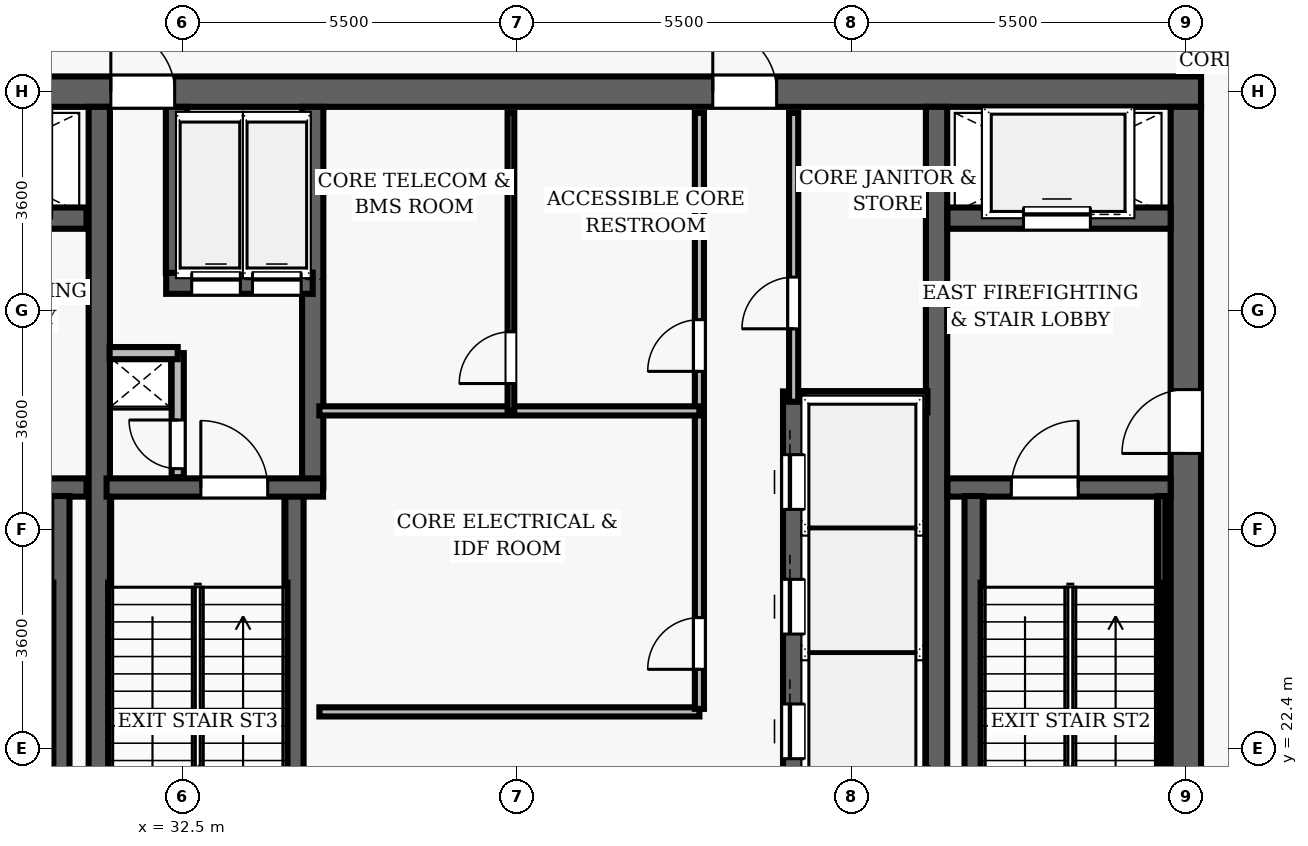
"""IFC4 building model, lengths in metres.
Left out: names, types, materials, properties, quantities, classifications, styles, units other than length and angle.
Written with IfcOpenShell. Run it as: python <this file> out.ifc"""

import sys

from ifc_helpers import new_model, si_unit, direction, frame, frame_2d, origin, place, context, subcontext, project, spatial, rectangle, extrude, element, fill, save


model = new_model("IFC4")
c1 = context("Model", 3, precision=1e-05, world=origin(), true_north=direction((0.0, 1.0)))
c2 = subcontext(c1, "Body", "Model", "MODEL_VIEW")
j1 = project(units=[si_unit("LENGTHUNIT", "METRE"), si_unit("PLANEANGLEUNIT", "RADIAN")], contexts=[c1])
p1 = place(None, origin())
s1 = spatial("IfcSite", under=j1, at=p1, CompositionType="ELEMENT")
p2 = place(p1, origin())
s2 = spatial("IfcBuilding", under=s1, at=p2, CompositionType="ELEMENT")
p3 = place(p2, frame((0.0, 0.0, 236.65)))
s3 = spatial("IfcBuildingStorey", under=s2, at=p3, CompositionType="ELEMENT", Elevation=236.65)
p4 = place(p3, frame((26.75, 33.2, 0.0), z_axis=(0.0, 0.0, 1.0), x_axis=(1.0, 0.0, 0.0)))
e1 = element("IfcWall", 1, at=p4, inside=s3, PredefinedType="SHEAR", context=c2, shape_type="SweptSolid", body=[
    extrude(rectangle(XDim=22.5, YDim=0.5, at=frame_2d((11.25, 0.0))), origin(), (0.0, 0.0, 1.0), 5.4),
])
p5 = place(p4, frame((4.57, 0.0, 0.0)))
e2 = element("IfcOpeningElement", 2, at=p5, cuts=e1, PredefinedType="OPENING", context=c2, shape_type="SweptSolid", body=[
    extrude(rectangle(XDim=1.05, YDim=2.15, at=frame_2d((0.525, 1.075))), frame((0.0, 0.26, 0.0), z_axis=(0.0, -1.0, 0.0), x_axis=(1.0, 0.0, 0.0)), (0.0, 0.0, 1.0), 0.52),
])
p6 = place(p4, frame((14.47, 0.0, 0.0)))
e3 = element("IfcOpeningElement", 3, at=p6, cuts=e1, PredefinedType="OPENING", context=c2, shape_type="SweptSolid", body=[
    extrude(rectangle(XDim=1.05, YDim=2.15, at=frame_2d((0.525, 1.075))), frame((0.0, 0.26, 0.0), z_axis=(0.0, -1.0, 0.0), x_axis=(1.0, 0.0, 0.0)), (0.0, 0.0, 1.0), 0.52),
])
p7 = place(p3, frame((49.0, 19.05, 0.0), z_axis=(0.0, 0.0, 1.0), x_axis=(0.0, 1.0, 0.0)))
e4 = element("IfcWall", 4, at=p7, inside=s3, PredefinedType="SHEAR", context=c2, shape_type="SweptSolid", body=[
    extrude(rectangle(XDim=13.9, YDim=0.5, at=frame_2d((6.95, 0.0))), origin(), (0.0, 0.0, 1.0), 5.4),
])
p8 = place(p7, frame((8.2, 0.0, 0.0)))
e5 = element("IfcOpeningElement", 5, at=p8, cuts=e4, PredefinedType="OPENING", context=c2, shape_type="SweptSolid", body=[
    extrude(rectangle(XDim=1.05, YDim=2.15, at=frame_2d((0.525, 1.075))), frame((0.0, 0.26, 0.0), z_axis=(0.0, -1.0, 0.0), x_axis=(1.0, 0.0, 0.0)), (0.0, 0.0, 1.0), 0.52),
])
for number, where, z_axis, x_axis in (
    (6, (31.13, 19.05, 0.0), (0.0, 0.0, 1.0), (0.0, 1.0, 0.0)),
    (7, (44.9, 19.05, 0.0), (0.0, 0.0, 1.0), (0.0, 1.0, 0.0)),
):
    element("IfcWall", number, at=place(p3, frame(where, z_axis=z_axis, x_axis=x_axis)), inside=s3, PredefinedType="SHEAR", context=c2, shape_type="SweptSolid", body=[
        extrude(rectangle(XDim=13.9, YDim=0.35, at=frame_2d((6.95, 0.0))), origin(), (0.0, 0.0, 1.0), 5.4),
    ])
p9 = place(p3, frame((27.25, 26.69, 0.0), z_axis=(0.0, 0.0, 1.0), x_axis=(1.0, 0.0, 0.0)))
e8 = element("IfcWall", 8, at=p9, inside=s3, PredefinedType="SHEAR", context=c2, shape_type="SweptSolid", body=[
    extrude(rectangle(XDim=3.67, YDim=0.3, at=frame_2d((1.835, 0.0))), origin(), (0.0, 0.0, 1.0), 5.4),
])
p10 = place(p9, frame((1.05, 0.0, 0.0)))
e9 = element("IfcOpeningElement", 9, at=p10, cuts=e8, PredefinedType="OPENING", context=c2, shape_type="SweptSolid", body=[
    extrude(rectangle(XDim=1.1, YDim=2.15, at=frame_2d((0.55, 1.075))), frame((0.0, 0.16, 0.0), z_axis=(0.0, -1.0, 0.0), x_axis=(1.0, 0.0, 0.0)), (0.0, 0.0, 1.0), 0.32),
])
p11 = place(p3, frame((30.49, 19.05, 0.0), z_axis=(0.0, 0.0, 1.0), x_axis=(0.0, 1.0, 0.0)))
e10 = element("IfcWall", 10, at=p11, inside=s3, PredefinedType="SHEAR", context=c2, shape_type="SweptSolid", body=[
    extrude(rectangle(XDim=7.5, YDim=0.3, at=frame_2d((3.75, 0.0))), origin(), (0.0, 0.0, 1.0), 5.4),
])
p12 = place(p3, frame((27.25, 31.12, 0.0), z_axis=(0.0, 0.0, 1.0), x_axis=(1.0, 0.0, 0.0)))
e11 = element("IfcWall", 11, at=p12, inside=s3, PredefinedType="SHEAR", context=c2, shape_type="SweptSolid", body=[
    extrude(rectangle(XDim=3.67, YDim=0.35, at=frame_2d((1.835, 0.0))), origin(), (0.0, 0.0, 1.0), 4.04),
])
p13 = place(p12, frame((1.25, 0.0, 0.0)))
e12 = element("IfcOpeningElement", 12, at=p13, cuts=e11, PredefinedType="OPENING", context=c2, shape_type="SweptSolid", body=[
    extrude(rectangle(XDim=1.1, YDim=2.15, at=frame_2d((0.55, 1.075))), frame((0.0, 0.185, 0.0), z_axis=(0.0, -1.0, 0.0), x_axis=(1.0, 0.0, 0.0)), (0.0, 0.0, 1.0), 0.37),
])
p14 = place(p3, frame((45.08, 26.69, 0.0), z_axis=(0.0, 0.0, 1.0), x_axis=(1.0, 0.0, 0.0)))
e13 = element("IfcWall", 13, at=p14, inside=s3, PredefinedType="SHEAR", context=c2, shape_type="SweptSolid", body=[
    extrude(rectangle(XDim=3.67, YDim=0.3, at=frame_2d((1.835, 0.0))), origin(), (0.0, 0.0, 1.0), 5.4),
])
p15 = place(p14, frame((1.05, 0.0, 0.0)))
e14 = element("IfcOpeningElement", 14, at=p15, cuts=e13, PredefinedType="OPENING", context=c2, shape_type="SweptSolid", body=[
    extrude(rectangle(XDim=1.1, YDim=2.15, at=frame_2d((0.55, 1.075))), frame((0.0, 0.16, 0.0), z_axis=(0.0, -1.0, 0.0), x_axis=(1.0, 0.0, 0.0)), (0.0, 0.0, 1.0), 0.32),
])
p16 = place(p3, frame((45.51, 19.05, 0.0), z_axis=(0.0, 0.0, 1.0), x_axis=(0.0, 1.0, 0.0)))
e15 = element("IfcWall", 15, at=p16, inside=s3, PredefinedType="SHEAR", context=c2, shape_type="SweptSolid", body=[
    extrude(rectangle(XDim=7.5, YDim=0.3, at=frame_2d((3.75, 0.0))), origin(), (0.0, 0.0, 1.0), 5.4),
])
p17 = place(p3, frame((48.605, 19.1, 0.0), z_axis=(0.0, 0.0, 1.0), x_axis=(0.0, 1.0, 0.0)))
e16 = element("IfcWall", 16, at=p17, inside=s3, PredefinedType="SHEAR", context=c2, shape_type="SweptSolid", body=[
    extrude(rectangle(XDim=7.45, YDim=0.12, at=frame_2d((3.725, 0.0))), origin(), (0.0, 0.0, 1.0), 5.4),
])
p18 = place(p3, frame((45.08, 31.12, 0.0), z_axis=(0.0, 0.0, 1.0), x_axis=(1.0, 0.0, 0.0)))
e17 = element("IfcWall", 17, at=p18, inside=s3, PredefinedType="SHEAR", context=c2, shape_type="SweptSolid", body=[
    extrude(rectangle(XDim=3.67, YDim=0.35, at=frame_2d((1.835, 0.0))), origin(), (0.0, 0.0, 1.0), 4.04),
])
p19 = place(p18, frame((1.25, 0.0, 0.0)))
e18 = element("IfcOpeningElement", 18, at=p19, cuts=e17, PredefinedType="OPENING", context=c2, shape_type="SweptSolid", body=[
    extrude(rectangle(XDim=1.1, YDim=2.15, at=frame_2d((0.55, 1.075))), frame((0.0, 0.185, 0.0), z_axis=(0.0, -1.0, 0.0), x_axis=(1.0, 0.0, 0.0)), (0.0, 0.0, 1.0), 0.37),
])
p20 = place(p3, frame((34.34, 19.05, 0.0), z_axis=(0.0, 0.0, 1.0), x_axis=(0.0, 1.0, 0.0)))
e19 = element("IfcWall", 19, at=p20, inside=s3, PredefinedType="SHEAR", context=c2, shape_type="SweptSolid", body=[
    extrude(rectangle(XDim=7.5, YDim=0.3, at=frame_2d((3.75, 0.0))), origin(), (0.0, 0.0, 1.0), 5.4),
])
p21 = place(p3, frame((34.64, 26.69, 0.0), z_axis=(0.0, 0.0, 1.0), x_axis=(0.0, 1.0, 0.0)))
e20 = element("IfcWall", 20, at=p21, inside=s3, PredefinedType="SHEAR", context=c2, shape_type="SweptSolid", body=[
    extrude(rectangle(XDim=6.26, YDim=0.35, at=frame_2d((3.13, 0.0))), origin(), (0.0, 0.0, 1.0), 5.4),
])
p22 = place(p3, frame((31.25, 26.69, 0.0), z_axis=(0.0, 0.0, 1.0), x_axis=(1.0, 0.0, 0.0)))
e21 = element("IfcWall", 21, at=p22, inside=s3, PredefinedType="SHEAR", context=c2, shape_type="SweptSolid", body=[
    extrude(rectangle(XDim=3.56, YDim=0.3, at=frame_2d((1.78, 0.0))), origin(), (0.0, 0.0, 1.0), 5.4),
])
p23 = place(p22, frame((1.55, 0.0, 0.0)))
e22 = element("IfcOpeningElement", 22, at=p23, cuts=e21, PredefinedType="OPENING", context=c2, shape_type="SweptSolid", body=[
    extrude(rectangle(XDim=1.1, YDim=2.15, at=frame_2d((0.55, 1.075))), frame((0.0, 0.16, 0.0), z_axis=(0.0, -1.0, 0.0), x_axis=(1.0, 0.0, 0.0)), (0.0, 0.0, 1.0), 0.32),
])
p24 = place(p3, frame((32.23, 30.05, 0.0), z_axis=(0.0, 0.0, 1.0), x_axis=(1.0, 0.0, 0.0)))
e23 = element("IfcWall", 23, at=p24, inside=s3, PredefinedType="SHEAR", context=c2, shape_type="SweptSolid", body=[
    extrude(rectangle(XDim=2.41, YDim=0.35, at=frame_2d((1.205, 0.0))), origin(), (0.0, 0.0, 1.0), 4.04),
])
p25 = place(p24, frame((0.42, 0.0, 0.0)))
e24 = element("IfcOpeningElement", 24, at=p25, cuts=e23, PredefinedType="OPENING", context=c2, shape_type="SweptSolid", body=[
    extrude(rectangle(XDim=0.8, YDim=2.15, at=frame_2d((0.4, 1.075))), frame((0.0, 0.185, 0.0), z_axis=(0.0, -1.0, 0.0), x_axis=(1.0, 0.0, 0.0)), (0.0, 0.0, 1.0), 0.37),
])
p26 = place(p24, frame((1.42, 0.0, 0.0)))
e25 = element("IfcOpeningElement", 25, at=p26, cuts=e23, PredefinedType="OPENING", context=c2, shape_type="SweptSolid", body=[
    extrude(rectangle(XDim=0.8, YDim=2.15, at=frame_2d((0.4, 1.075))), frame((0.0, 0.185, 0.0), z_axis=(0.0, -1.0, 0.0), x_axis=(1.0, 0.0, 0.0)), (0.0, 0.0, 1.0), 0.37),
])
p27 = place(p3, frame((32.4, 30.22, 0.0), z_axis=(0.0, 0.0, 1.0), x_axis=(0.0, 1.0, 0.0)))
e26 = element("IfcWall", 26, at=p27, inside=s3, PredefinedType="SHEAR", context=c2, shape_type="SweptSolid", body=[
    extrude(rectangle(XDim=2.73, YDim=0.35, at=frame_2d((1.365, 0.0))), origin(), (0.0, 0.0, 1.0), 4.04),
])
p28 = place(p3, frame((32.42, 26.86, 0.0), z_axis=(0.0, 0.0, 1.0), x_axis=(0.0, 1.0, 0.0)))
e27 = element("IfcWall", 27, at=p28, inside=s3, PredefinedType="PARTITIONING", context=c2, shape_type="SweptSolid", body=[
    extrude(rectangle(XDim=2.04, YDim=0.2, at=frame_2d((1.02, 0.0))), origin(), (0.0, 0.0, 1.0), 4.04),
])
p29 = place(p28, frame((0.14, 0.0, 0.0)))
e28 = element("IfcOpeningElement", 28, at=p29, cuts=e27, PredefinedType="OPENING", context=c2, shape_type="SweptSolid", body=[
    extrude(rectangle(XDim=0.8, YDim=2.05, at=frame_2d((0.4, 1.025))), frame((0.0, 0.11, 0.0), z_axis=(0.0, -1.0, 0.0), x_axis=(1.0, 0.0, 0.0)), (0.0, 0.0, 1.0), 0.22),
])
p30 = place(p3, frame((31.3, 28.9, 0.0), z_axis=(0.0, 0.0, 1.0), x_axis=(1.0, 0.0, 0.0)))
e29 = element("IfcWall", 29, at=p30, inside=s3, PredefinedType="PARTITIONING", context=c2, shape_type="SweptSolid", body=[
    extrude(rectangle(XDim=1.12, YDim=0.2, at=frame_2d((0.56, 0.0))), origin(), (0.0, 0.0, 1.0), 4.04),
])
p31 = place(p3, frame((42.55, 21.73, 0.0), z_axis=(0.0, 0.0, 1.0), x_axis=(0.0, 1.0, 0.0)))
e30 = element("IfcWall", 30, at=p31, inside=s3, PredefinedType="SHEAR", context=c2, shape_type="SweptSolid", body=[
    extrude(rectangle(XDim=6.54, YDim=0.35, at=frame_2d((3.27, 0.0))), origin(), (0.0, 0.0, 1.0), 4.04),
])
p32 = place(p31, frame((0.5, 0.0, 0.0)))
e31 = element("IfcOpeningElement", 31, at=p32, cuts=e30, PredefinedType="OPENING", context=c2, shape_type="SweptSolid", body=[
    extrude(rectangle(XDim=0.9, YDim=2.15, at=frame_2d((0.45, 1.075))), frame((0.0, 0.185, 0.0), z_axis=(0.0, -1.0, 0.0), x_axis=(1.0, 0.0, 0.0)), (0.0, 0.0, 1.0), 0.37),
])
p33 = place(p31, frame((2.55, 0.0, 0.0)))
e32 = element("IfcOpeningElement", 32, at=p33, cuts=e30, PredefinedType="OPENING", context=c2, shape_type="SweptSolid", body=[
    extrude(rectangle(XDim=0.9, YDim=2.15, at=frame_2d((0.45, 1.075))), frame((0.0, 0.185, 0.0), z_axis=(0.0, -1.0, 0.0), x_axis=(1.0, 0.0, 0.0)), (0.0, 0.0, 1.0), 0.37),
])
p34 = place(p31, frame((4.6, 0.0, 0.0)))
e33 = element("IfcOpeningElement", 33, at=p34, cuts=e30, PredefinedType="OPENING", context=c2, shape_type="SweptSolid", body=[
    extrude(rectangle(XDim=0.9, YDim=2.15, at=frame_2d((0.45, 1.075))), frame((0.0, 0.185, 0.0), z_axis=(0.0, -1.0, 0.0), x_axis=(1.0, 0.0, 0.0)), (0.0, 0.0, 1.0), 0.37),
])
p35 = place(p3, frame((42.72, 28.1, 0.0), z_axis=(0.0, 0.0, 1.0), x_axis=(1.0, 0.0, 0.0)))
e34 = element("IfcWall", 34, at=p35, inside=s3, PredefinedType="SHEAR", context=c2, shape_type="SweptSolid", body=[
    extrude(rectangle(XDim=2.03, YDim=0.35, at=frame_2d((1.015, 0.0))), origin(), (0.0, 0.0, 1.0), 4.04),
])
p36 = place(p3, frame((34.75, 23.0, 0.0), z_axis=(0.0, 0.0, 1.0), x_axis=(1.0, 0.0, 0.0)))
e35 = element("IfcWall", 35, at=p36, inside=s3, PredefinedType="PARTITIONING", context=c2, shape_type="SweptSolid", body=[
    extrude(rectangle(XDim=6.25, YDim=0.15, at=frame_2d((3.125, 0.0))), origin(), (0.0, 0.0, 1.0), 4.04),
])
p37 = place(p3, frame((41.0, 23.05, 0.0), z_axis=(0.0, 0.0, 1.0), x_axis=(0.0, 1.0, 0.0)))
e36 = element("IfcWall", 36, at=p37, inside=s3, PredefinedType="PARTITIONING", context=c2, shape_type="SweptSolid", body=[
    extrude(rectangle(XDim=9.8, YDim=0.15, at=frame_2d((4.9, 0.0))), origin(), (0.0, 0.0, 1.0), 4.04),
])
p38 = place(p37, frame((0.65, 0.0, 0.0)))
e37 = element("IfcOpeningElement", 37, at=p38, cuts=e36, PredefinedType="OPENING", context=c2, shape_type="SweptSolid", body=[
    extrude(rectangle(XDim=0.85, YDim=2.1, at=frame_2d((0.425, 1.05))), frame((0.0, 0.085, 0.0), z_axis=(0.0, -1.0, 0.0), x_axis=(1.0, 0.0, 0.0)), (0.0, 0.0, 1.0), 0.17),
])
p39 = place(p37, frame((5.55, 0.0, 0.0)))
e38 = element("IfcOpeningElement", 38, at=p39, cuts=e36, PredefinedType="OPENING", context=c2, shape_type="SweptSolid", body=[
    extrude(rectangle(XDim=0.85, YDim=2.1, at=frame_2d((0.425, 1.05))), frame((0.0, 0.085, 0.0), z_axis=(0.0, -1.0, 0.0), x_axis=(1.0, 0.0, 0.0)), (0.0, 0.0, 1.0), 0.17),
])
p40 = place(p3, frame((34.75, 27.95, 0.0), z_axis=(0.0, 0.0, 1.0), x_axis=(1.0, 0.0, 0.0)))
e39 = element("IfcWall", 39, at=p40, inside=s3, PredefinedType="PARTITIONING", context=c2, shape_type="SweptSolid", body=[
    extrude(rectangle(XDim=6.25, YDim=0.15, at=frame_2d((3.125, 0.0))), origin(), (0.0, 0.0, 1.0), 4.04),
])
p41 = place(p3, frame((37.9, 27.95, 0.0), z_axis=(0.0, 0.0, 1.0), x_axis=(0.0, 1.0, 0.0)))
e40 = element("IfcWall", 40, at=p41, inside=s3, PredefinedType="PARTITIONING", context=c2, shape_type="SweptSolid", body=[
    extrude(rectangle(XDim=4.9, YDim=0.11, at=frame_2d((2.45, 0.0))), origin(), (0.0, 0.0, 1.0), 4.04),
])
p42 = place(p41, frame((0.45, 0.0, 0.0)))
e41 = element("IfcOpeningElement", 41, at=p42, cuts=e40, PredefinedType="OPENING", context=c2, shape_type="SweptSolid", body=[
    extrude(rectangle(XDim=0.85, YDim=2.1, at=frame_2d((0.425, 1.05))), frame((0.0, 0.065, 0.0), z_axis=(0.0, -1.0, 0.0), x_axis=(1.0, 0.0, 0.0)), (0.0, 0.0, 1.0), 0.13),
])
p43 = place(p3, frame((42.55, 28.1, 0.0), z_axis=(0.0, 0.0, 1.0), x_axis=(0.0, 1.0, 0.0)))
e42 = element("IfcWall", 42, at=p43, inside=s3, PredefinedType="PARTITIONING", context=c2, shape_type="SweptSolid", body=[
    extrude(rectangle(XDim=4.75, YDim=0.15, at=frame_2d((2.375, 0.0))), origin(), (0.0, 0.0, 1.0), 4.04),
])
p44 = place(p43, frame((1.2, 0.0, 0.0)))
e43 = element("IfcOpeningElement", 43, at=p44, cuts=e42, PredefinedType="OPENING", context=c2, shape_type="SweptSolid", body=[
    extrude(rectangle(XDim=0.85, YDim=2.1, at=frame_2d((0.425, 1.05))), frame((0.0, 0.085, 0.0), z_axis=(0.0, -1.0, 0.0), x_axis=(1.0, 0.0, 0.0)), (0.0, 0.0, 1.0), 0.17),
])
p45 = place(p15, origin())
e44 = element("IfcDoor", 44, at=p45, inside=s3, OperationType="SINGLE_SWING_RIGHT", PredefinedType="DOOR", context=c2, shape_type="SweptSolid", body=[
    extrude(rectangle(XDim=1.1, YDim=2.15, at=frame_2d((0.55, 1.075))), frame((0.0, 0.025, 0.0), z_axis=(0.0, -1.0, 0.0), x_axis=(1.0, 0.0, 0.0)), (0.0, 0.0, 1.0), 0.05),
])
fill(e14, e44)
p46 = place(p8, origin())
e45 = element("IfcDoor", 45, at=p46, inside=s3, OperationType="SINGLE_SWING_LEFT", PredefinedType="DOOR", context=c2, shape_type="SweptSolid", body=[
    extrude(rectangle(XDim=1.05, YDim=2.15, at=frame_2d((0.525, 1.075))), frame((0.0, 0.025, 0.0), z_axis=(0.0, -1.0, 0.0), x_axis=(1.0, 0.0, 0.0)), (0.0, 0.0, 1.0), 0.05),
])
fill(e5, e45)
p47 = place(p23, origin())
e46 = element("IfcDoor", 46, at=p47, inside=s3, OperationType="SINGLE_SWING_LEFT", PredefinedType="DOOR", context=c2, shape_type="SweptSolid", body=[
    extrude(rectangle(XDim=1.1, YDim=2.15, at=frame_2d((0.55, 1.075))), frame((0.0, 0.025, 0.0), z_axis=(0.0, -1.0, 0.0), x_axis=(1.0, 0.0, 0.0)), (0.0, 0.0, 1.0), 0.05),
])
fill(e22, e46)
p48 = place(p29, origin())
e47 = element("IfcDoor", 47, at=p48, inside=s3, OperationType="SINGLE_SWING_RIGHT", PredefinedType="DOOR", context=c2, shape_type="SweptSolid", body=[
    extrude(rectangle(XDim=0.8, YDim=2.05, at=frame_2d((0.4, 1.025))), frame((0.0, 0.025, 0.0), z_axis=(0.0, -1.0, 0.0), x_axis=(1.0, 0.0, 0.0)), (0.0, 0.0, 1.0), 0.05),
])
fill(e28, e47)
p49 = place(p5, origin())
e48 = element("IfcDoor", 48, at=p49, inside=s3, OperationType="SINGLE_SWING_LEFT", PredefinedType="DOOR", context=c2, shape_type="SweptSolid", body=[
    extrude(rectangle(XDim=1.05, YDim=2.15, at=frame_2d((0.525, 1.075))), frame((0.0, 0.025, 0.0), z_axis=(0.0, -1.0, 0.0), x_axis=(1.0, 0.0, 0.0)), (0.0, 0.0, 1.0), 0.05),
])
fill(e2, e48)
p50 = place(p6, origin())
e49 = element("IfcDoor", 49, at=p50, inside=s3, OperationType="SINGLE_SWING_LEFT", PredefinedType="DOOR", context=c2, shape_type="SweptSolid", body=[
    extrude(rectangle(XDim=1.05, YDim=2.15, at=frame_2d((0.525, 1.075))), frame((0.0, 0.025, 0.0), z_axis=(0.0, -1.0, 0.0), x_axis=(1.0, 0.0, 0.0)), (0.0, 0.0, 1.0), 0.05),
])
fill(e3, e49)
p51 = place(p38, origin())
e50 = element("IfcDoor", 50, at=p51, inside=s3, OperationType="SINGLE_SWING_LEFT", PredefinedType="DOOR", context=c2, shape_type="SweptSolid", body=[
    extrude(rectangle(XDim=0.85, YDim=2.1, at=frame_2d((0.425, 1.05))), frame((0.0, 0.025, 0.0), z_axis=(0.0, -1.0, 0.0), x_axis=(1.0, 0.0, 0.0)), (0.0, 0.0, 1.0), 0.05),
])
fill(e37, e50)
p52 = place(p39, origin())
e51 = element("IfcDoor", 51, at=p52, inside=s3, OperationType="SINGLE_SWING_LEFT", PredefinedType="DOOR", context=c2, shape_type="SweptSolid", body=[
    extrude(rectangle(XDim=0.85, YDim=2.1, at=frame_2d((0.425, 1.05))), frame((0.0, 0.025, 0.0), z_axis=(0.0, -1.0, 0.0), x_axis=(1.0, 0.0, 0.0)), (0.0, 0.0, 1.0), 0.05),
])
fill(e38, e51)
p53 = place(p42, origin())
e52 = element("IfcDoor", 52, at=p53, inside=s3, OperationType="SINGLE_SWING_LEFT", PredefinedType="DOOR", context=c2, shape_type="SweptSolid", body=[
    extrude(rectangle(XDim=0.85, YDim=2.1, at=frame_2d((0.425, 1.05))), frame((0.0, 0.025, 0.0), z_axis=(0.0, -1.0, 0.0), x_axis=(1.0, 0.0, 0.0)), (0.0, 0.0, 1.0), 0.05),
])
fill(e41, e52)
p54 = place(p44, origin())
e53 = element("IfcDoor", 53, at=p54, inside=s3, OperationType="SINGLE_SWING_LEFT", PredefinedType="DOOR", context=c2, shape_type="SweptSolid", body=[
    extrude(rectangle(XDim=0.85, YDim=2.1, at=frame_2d((0.425, 1.05))), frame((0.0, 0.025, 0.0), z_axis=(0.0, -1.0, 0.0), x_axis=(1.0, 0.0, 0.0)), (0.0, 0.0, 1.0), 0.05),
])
fill(e43, e53)
p55 = place(p32, origin())
e54 = element("IfcDoor", 54, at=p55, inside=s3, OperationType="SLIDING_TO_LEFT", PredefinedType="DOOR", context=c2, shape_type="SweptSolid", body=[
    extrude(rectangle(XDim=0.9, YDim=2.15, at=frame_2d((0.45, 1.075))), frame((0.0, 0.025, 0.0), z_axis=(0.0, -1.0, 0.0), x_axis=(1.0, 0.0, 0.0)), (0.0, 0.0, 1.0), 0.05),
])
fill(e31, e54)
p56 = place(p33, origin())
e55 = element("IfcDoor", 55, at=p56, inside=s3, OperationType="SLIDING_TO_LEFT", PredefinedType="DOOR", context=c2, shape_type="SweptSolid", body=[
    extrude(rectangle(XDim=0.9, YDim=2.15, at=frame_2d((0.45, 1.075))), frame((0.0, 0.025, 0.0), z_axis=(0.0, -1.0, 0.0), x_axis=(1.0, 0.0, 0.0)), (0.0, 0.0, 1.0), 0.05),
])
fill(e32, e55)
p57 = place(p34, origin())
e56 = element("IfcDoor", 56, at=p57, inside=s3, OperationType="SLIDING_TO_LEFT", PredefinedType="DOOR", context=c2, shape_type="SweptSolid", body=[
    extrude(rectangle(XDim=0.9, YDim=2.15, at=frame_2d((0.45, 1.075))), frame((0.0, 0.025, 0.0), z_axis=(0.0, -1.0, 0.0), x_axis=(1.0, 0.0, 0.0)), (0.0, 0.0, 1.0), 0.05),
])
fill(e33, e56)
p58 = place(p19, origin())
e57 = element("IfcDoor", 57, at=p58, inside=s3, OperationType="SLIDING_TO_LEFT", PredefinedType="DOOR", context=c2, shape_type="SweptSolid", body=[
    extrude(rectangle(XDim=1.1, YDim=2.15, at=frame_2d((0.55, 1.075))), frame((0.0, 0.025, 0.0), z_axis=(0.0, -1.0, 0.0), x_axis=(1.0, 0.0, 0.0)), (0.0, 0.0, 1.0), 0.05),
])
fill(e18, e57)
p59 = place(p25, origin())
e58 = element("IfcDoor", 58, at=p59, inside=s3, OperationType="SLIDING_TO_LEFT", PredefinedType="DOOR", context=c2, shape_type="SweptSolid", body=[
    extrude(rectangle(XDim=0.8, YDim=2.15, at=frame_2d((0.4, 1.075))), frame((0.0, 0.025, 0.0), z_axis=(0.0, -1.0, 0.0), x_axis=(1.0, 0.0, 0.0)), (0.0, 0.0, 1.0), 0.05),
])
fill(e24, e58)
p60 = place(p26, origin())
e59 = element("IfcDoor", 59, at=p60, inside=s3, OperationType="SLIDING_TO_LEFT", PredefinedType="DOOR", context=c2, shape_type="SweptSolid", body=[
    extrude(rectangle(XDim=0.8, YDim=2.15, at=frame_2d((0.4, 1.075))), frame((0.0, 0.025, 0.0), z_axis=(0.0, -1.0, 0.0), x_axis=(1.0, 0.0, 0.0)), (0.0, 0.0, 1.0), 0.05),
])
fill(e25, e59)
save(model, sys.argv[1])
